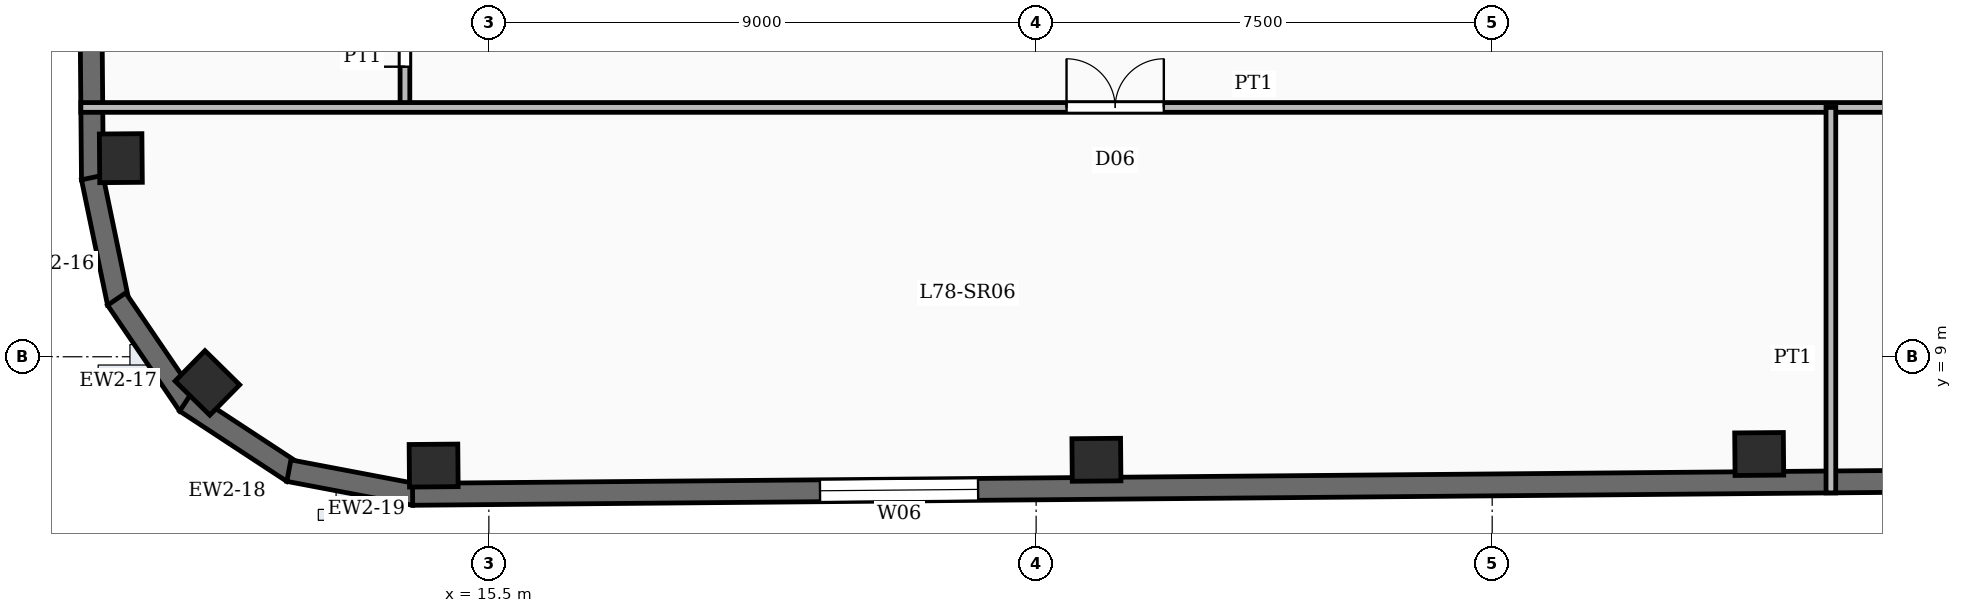
"""IFC4 building model, lengths in metres.
Left out: names, types, materials, properties, quantities, classifications, styles, units other than length and angle.
Written with IfcOpenShell. Run it as: python <this file> out.ifc"""

import sys

from ifc_helpers import new_model, si_unit, direction, frame, frame_2d, origin, origin_2d, place, context, subcontext, project, spatial, rectangle, extrude, element, fill, save


model = new_model("IFC4")
c1 = context("Model", 3, precision=1e-05, world=origin(), true_north=direction((0.0, 1.0)))
c2 = subcontext(c1, "Body", "Model", "MODEL_VIEW")
j1 = project(units=[si_unit("LENGTHUNIT", "METRE"), si_unit("PLANEANGLEUNIT", "RADIAN")], contexts=[c1])
p1 = place(None, origin())
s1 = spatial("IfcSite", under=j1, at=p1, CompositionType="ELEMENT")
p2 = place(p1, origin())
s2 = spatial("IfcBuilding", under=s1, at=p2, CompositionType="ELEMENT")
p3 = place(p2, frame((0.0, 0.0, 317.2)))
s3 = spatial("IfcBuildingStorey", under=s2, at=p3, CompositionType="ELEMENT", Elevation=317.2)
for number, where, z_axis, x_axis in (
    (1, (14.592, 7.211, -0.24), (0.0, 0.0, 1.0), (1.0, 0.009, 0.0)),
    (2, (25.491, 7.306, -0.24), (0.0, 0.0, 1.0), (1.0, 0.009, 0.0)),
    (3, (36.391, 7.401, -0.24), (0.0, 0.0, 1.0), (1.0, 0.009, 0.0)),
    (4, (9.448, 12.266, -0.24), (0.0, 0.0, 1.0), (-0.009, 1.0, 0.0)),
    (5, (10.871, 8.569, -0.24), (0.0, 0.0, 1.0), (-0.713, 0.701, 0.0)),
):
    element("IfcColumn", number, at=place(p3, frame(where, z_axis=z_axis, x_axis=x_axis)), inside=s3, PredefinedType="COLUMN", context=c2, shape_type="SweptSolid", body=[
        extrude(rectangle(XDim=0.8, YDim=0.7, at=origin_2d()), origin(), (0.0, 0.0, 1.0), 4.62),
    ])
p4 = place(p3, frame((8.981, 11.912, 0.0), z_axis=(0.0, 0.0, 1.0), x_axis=(-0.008726453825, 0.999961923777, 0.0)))
e6 = element("IfcWall", 6, at=p4, inside=s3, PredefinedType="SOLIDWALL", context=c2, shape_type="SweptSolid", body=[
    extrude(rectangle(XDim=34.3, YDim=0.36, at=frame_2d((17.15, 0.0))), origin(), (0.0, 0.0, 1.0), 4.38),
])
p5 = place(p4, frame((4.2, 0.0, 0.88)))
e7 = element("IfcOpeningElement", 7, at=p5, cuts=e6, PredefinedType="OPENING", context=c2, shape_type="SweptSolid", body=[
    extrude(rectangle(XDim=1.35, YDim=2.2, at=frame_2d((0.675, 1.1))), frame((0.0, 0.19, 0.0), z_axis=(0.0, -1.0, 0.0), x_axis=(1.0, 0.0, 0.0)), (0.0, 0.0, 1.0), 0.38),
])
p6 = place(p4, frame((15.4, 0.0, 0.88)))
e8 = element("IfcOpeningElement", 8, at=p6, cuts=e6, PredefinedType="OPENING", context=c2, shape_type="SweptSolid", body=[
    extrude(rectangle(XDim=1.35, YDim=2.2, at=frame_2d((0.675, 1.1))), frame((0.0, 0.19, 0.0), z_axis=(0.0, -1.0, 0.0), x_axis=(1.0, 0.0, 0.0)), (0.0, 0.0, 1.0), 0.38),
])
p7 = place(p4, frame((26.6, 0.0, 0.88)))
e9 = element("IfcOpeningElement", 9, at=p7, cuts=e6, PredefinedType="OPENING", context=c2, shape_type="SweptSolid", body=[
    extrude(rectangle(XDim=1.35, YDim=2.2, at=frame_2d((0.675, 1.1))), frame((0.0, 0.19, 0.0), z_axis=(0.0, -1.0, 0.0), x_axis=(1.0, 0.0, 0.0)), (0.0, 0.0, 1.0), 0.38),
])
p8 = place(p3, frame((9.406, 9.884, 0.0), z_axis=(0.0, 0.0, 1.0), x_axis=(-0.203685893209, 0.979036289883, 0.0)))
e10 = element("IfcWall", 10, at=p8, inside=s3, PredefinedType="SOLIDWALL", context=c2, shape_type="SweptSolid", body=[
    extrude(rectangle(XDim=2.107, YDim=0.36, at=frame_2d((1.054, 0.0))), origin(), (0.0, 0.0, 1.0), 4.38),
])
for number, where, z_axis, x_axis in (
    (11, (10.564, 8.207, 0.0), (0.0, 0.0, 1.0), (-0.563, 0.827, 0.0)),
    (12, (12.276, 7.101, 0.0), (0.0, 0.0, 1.0), (-0.836, 0.548, 0.0)),
):
    element("IfcWall", number, at=place(p3, frame(where, z_axis=z_axis, x_axis=x_axis)), inside=s3, PredefinedType="SOLIDWALL", context=c2, shape_type="SweptSolid", body=[
        extrude(rectangle(XDim=2.107, YDim=0.36, at=frame_2d((1.053, 0.0))), origin(), (0.0, 0.0, 1.0), 4.38),
    ])
p9 = place(p3, frame((14.281, 6.734, 0.0), z_axis=(0.0, 0.0, 1.0), x_axis=(-0.982445905584, 0.186547695246, 0.0)))
e13 = element("IfcWall", 13, at=p9, inside=s3, PredefinedType="SOLIDWALL", context=c2, shape_type="SweptSolid", body=[
    extrude(rectangle(XDim=2.107, YDim=0.36, at=frame_2d((1.054, 0.0))), origin(), (0.0, 0.0, 1.0), 4.38),
])
p10 = place(p3, frame((58.544, 7.124, 0.0), z_axis=(0.0, 0.0, 1.0), x_axis=(-0.999961896442, -0.008729585516, 0.0)))
e14 = element("IfcWall", 14, at=p10, inside=s3, PredefinedType="SOLIDWALL", context=c2, shape_type="SweptSolid", body=[
    extrude(rectangle(XDim=44.3, YDim=0.36, at=frame_2d((22.15, 0.0))), origin(), (0.0, 0.0, 1.0), 4.38),
])
p11 = place(p10, frame((2.6, 0.0, 0.8)))
e15 = element("IfcOpeningElement", 15, at=p11, cuts=e14, PredefinedType="OPENING", context=c2, shape_type="SweptSolid", body=[
    extrude(rectangle(XDim=2.6, YDim=3.2, at=frame_2d((1.3, 1.6))), frame((0.0, 0.19, 0.0), z_axis=(0.0, -1.0, 0.0), x_axis=(1.0, 0.0, 0.0)), (0.0, 0.0, 1.0), 0.38),
])
p12 = place(p10, frame((35.0, 0.0, 0.8)))
e16 = element("IfcOpeningElement", 16, at=p12, cuts=e14, PredefinedType="OPENING", context=c2, shape_type="SweptSolid", body=[
    extrude(rectangle(XDim=2.6, YDim=3.2, at=frame_2d((1.3, 1.6))), frame((0.0, 0.19, 0.0), z_axis=(0.0, -1.0, 0.0), x_axis=(1.0, 0.0, 0.0)), (0.0, 0.0, 1.0), 0.38),
])
p13 = place(p3, frame((8.79, 13.1, 0.0), z_axis=(0.0, 0.0, 1.0), x_axis=(1.0, 0.0, 0.0)))
e17 = element("IfcWall", 17, at=p13, inside=s3, PredefinedType="PARTITIONING", context=c2, shape_type="SweptSolid", body=[
    extrude(rectangle(XDim=55.102, YDim=0.16, at=frame_2d((27.551, 0.0))), origin(), (0.0, 0.0, 1.0), 3.44),
])
p14 = place(p13, frame((16.21, 0.0, 0.0)))
e18 = element("IfcOpeningElement", 18, at=p14, cuts=e17, PredefinedType="OPENING", context=c2, shape_type="SweptSolid", body=[
    extrude(rectangle(XDim=1.6, YDim=2.15, at=frame_2d((0.8, 1.075))), frame((0.0, 0.09, 0.0), z_axis=(0.0, -1.0, 0.0), x_axis=(1.0, 0.0, 0.0)), (0.0, 0.0, 1.0), 0.18),
])
p15 = place(p13, frame((37.21, 0.0, 0.0)))
e19 = element("IfcOpeningElement", 19, at=p15, cuts=e17, PredefinedType="OPENING", context=c2, shape_type="SweptSolid", body=[
    extrude(rectangle(XDim=1.6, YDim=2.15, at=frame_2d((0.8, 1.075))), frame((0.0, 0.09, 0.0), z_axis=(0.0, -1.0, 0.0), x_axis=(1.0, 0.0, 0.0)), (0.0, 0.0, 1.0), 0.18),
])
p16 = place(p3, frame((37.57, 6.761, 0.0), z_axis=(0.0, 0.0, 1.0), x_axis=(0.0, 1.0, 0.0)))
e20 = element("IfcWall", 20, at=p16, inside=s3, PredefinedType="PARTITIONING", context=c2, shape_type="SweptSolid", body=[
    extrude(rectangle(XDim=6.339, YDim=0.16, at=frame_2d((3.169, 0.0))), origin(), (0.0, 0.0, 1.0), 3.44),
])
p17 = place(p3, frame((14.12, 13.12, 0.0), z_axis=(0.0, 0.0, 1.0), x_axis=(0.0, 1.0, 0.0)))
e21 = element("IfcWall", 21, at=p17, inside=s3, PredefinedType="PARTITIONING", context=c2, shape_type="SweptSolid", body=[
    extrude(rectangle(XDim=2.3, YDim=0.16, at=frame_2d((1.15, 0.0))), origin(), (0.0, 0.0, 1.0), 3.44),
])
p18 = place(p17, frame((0.65, 0.0, 0.0)))
e22 = element("IfcOpeningElement", 22, at=p18, cuts=e21, PredefinedType="OPENING", context=c2, shape_type="SweptSolid", body=[
    extrude(rectangle(XDim=0.95, YDim=2.15, at=frame_2d((0.475, 1.075))), frame((0.0, 0.09, 0.0), z_axis=(0.0, -1.0, 0.0), x_axis=(1.0, 0.0, 0.0)), (0.0, 0.0, 1.0), 0.18),
])
p19 = place(p12, origin())
e23 = element("IfcWindow", 23, at=p19, inside=s3, PartitioningType="DOUBLE_PANEL_VERTICAL", PredefinedType="WINDOW", context=c2, shape_type="SweptSolid", body=[
    extrude(rectangle(XDim=2.6, YDim=3.2, at=frame_2d((1.3, 1.6))), frame((0.0, 0.03, 0.0), z_axis=(0.0, -1.0, 0.0), x_axis=(1.0, 0.0, 0.0)), (0.0, 0.0, 1.0), 0.06),
])
fill(e16, e23)
p20 = place(p14, origin())
e24 = element("IfcDoor", 24, at=p20, inside=s3, OperationType="DOUBLE_DOOR_SINGLE_SWING", PredefinedType="DOOR", context=c2, shape_type="SweptSolid", body=[
    extrude(rectangle(XDim=1.6, YDim=2.15, at=frame_2d((0.8, 1.075))), frame((0.0, 0.025, 0.0), z_axis=(0.0, -1.0, 0.0), x_axis=(1.0, 0.0, 0.0)), (0.0, 0.0, 1.0), 0.05),
])
fill(e18, e24)
p21 = place(p18, origin())
e25 = element("IfcDoor", 25, at=p21, inside=s3, OperationType="SINGLE_SWING_LEFT", PredefinedType="DOOR", context=c2, shape_type="SweptSolid", body=[
    extrude(rectangle(XDim=0.95, YDim=2.15, at=frame_2d((0.475, 1.075))), frame((0.0, 0.025, 0.0), z_axis=(0.0, -1.0, 0.0), x_axis=(1.0, 0.0, 0.0)), (0.0, 0.0, 1.0), 0.05),
])
fill(e22, e25)
save(model, sys.argv[1])
